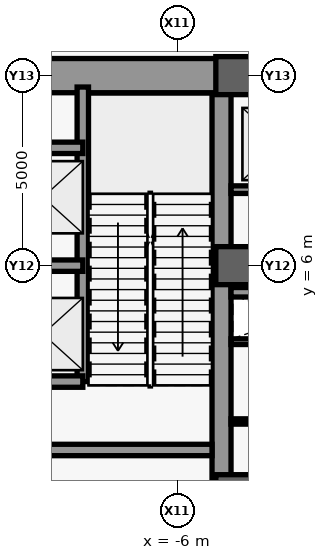
"""IFC4 building model, lengths in metres.
Left out: names, types, materials, properties, quantities, classifications, styles, units other than length and angle.
Written with IfcOpenShell. Run it as: python <this file> out.ifc"""

import sys

from ifc_helpers import new_model, si_unit, direction, frame, frame_2d, origin, origin_2d, place, context, subcontext, project, spatial, rectangle, extrude, source, transform, mapped, element, save


model = new_model("IFC4")
c1 = context("Model", 3, precision=1e-05, world=origin(), true_north=direction((0.0, 1.0)))
c2 = subcontext(c1, "Body", "Model", "MODEL_VIEW")
j1 = project(units=[si_unit("LENGTHUNIT", "METRE"), si_unit("PLANEANGLEUNIT", "RADIAN")], contexts=[c1])
p1 = place(None, origin())
s1 = spatial("IfcSite", under=j1, at=p1, CompositionType="ELEMENT")
p2 = place(p1, origin())
s2 = spatial("IfcBuilding", under=s1, at=p2, CompositionType="ELEMENT")
p3 = place(p2, origin())
s3 = spatial("IfcBuildingStorey", under=s2, at=p3, CompositionType="ELEMENT", Elevation=0.0)
m1 = source(origin(), c2, "Body", "SweptSolid", [
    extrude(rectangle(XDim=21.4, YDim=0.5, at=frame_2d((10.7, 0.0))), origin(), (0.0, 0.0, 1.0), 6.28),
])
p4 = place(p3, frame((-4.85, -10.7, 0.0), z_axis=(0.0, 0.0, 1.0), x_axis=(0.0, 1.0, 0.0)))
e1 = element("IfcWall", 1, at=p4, inside=s3, PredefinedType="SHEAR", context=c2, shape_type="MappedRepresentation", body=[
    mapped(m1, transform((0.0, 0.0, 0.0), scale=1.0)),
])
m2 = source(origin(), c2, "Body", "SweptSolid", [
    extrude(rectangle(XDim=5.85, YDim=0.9, at=frame_2d((2.925, 0.0))), origin(), (0.0, 0.0, 1.0), 6.28),
])
p5 = place(p3, frame((-10.7, 11.0, 0.0), z_axis=(0.0, 0.0, 1.0), x_axis=(1.0, 0.0, 0.0)))
e2 = element("IfcWall", 2, at=p5, inside=s3, PredefinedType="SHEAR", context=c2, shape_type="MappedRepresentation", body=[
    mapped(m2, transform((0.0, 0.0, 0.0), scale=1.0)),
])
m3 = source(origin(), c2, "Body", "SweptSolid", [
    extrude(rectangle(XDim=5.6, YDim=0.3, at=frame_2d((2.8, 0.0))), origin(), (0.0, 0.0, 1.0), 6.28),
])
p6 = place(p3, frame((-10.7, 1.15, 0.0), z_axis=(0.0, 0.0, 1.0), x_axis=(1.0, 0.0, 0.0)))
e3 = element("IfcWall", 3, at=p6, inside=s3, PredefinedType="SHEAR", context=c2, shape_type="MappedRepresentation", body=[
    mapped(m3, transform((0.0, 0.0, 0.0), scale=1.0)),
])
m4 = source(origin(), c2, "Body", "SweptSolid", [
    extrude(rectangle(XDim=9.2, YDim=0.5, at=frame_2d((4.6, 0.0))), origin(), (0.0, 0.0, 1.0), 6.28),
])
p7 = place(p3, frame((-4.6, 11.0, 0.0), z_axis=(0.0, 0.0, 1.0), x_axis=(1.0, 0.0, 0.0)))
e4 = element("IfcWall", 4, at=p7, inside=s3, PredefinedType="SHEAR", context=c2, shape_type="MappedRepresentation", body=[
    mapped(m4, transform((0.0, 0.0, 0.0), scale=1.0)),
])
m5 = source(origin(), c2, "Body", "SweptSolid", [
    extrude(rectangle(XDim=1.8, YDim=2.25, at=frame_2d((0.9, 1.125))), frame((0.0, 0.26, 0.0), z_axis=(0.0, -1.0, 0.0), x_axis=(1.0, 0.0, 0.0)), (0.0, 0.0, 1.0), 0.52),
])
p8 = place(p7, frame((3.7, 0.0, 0.0)))
e5 = element("IfcOpeningElement", 5, at=p8, cuts=e4, PredefinedType="OPENING", context=c2, shape_type="MappedRepresentation", body=[
    mapped(m5, transform((0.0, 0.0, 0.0), scale=1.0)),
])
m6 = source(origin(), c2, "Body", "SweptSolid", [
    extrude(rectangle(XDim=1.0, YDim=1.0, at=origin_2d()), origin(), (0.0, 0.0, 1.0), 6.6),
])
for number, where, z_axis, x_axis in (
    (6, (-4.5, 0.0, 0.0), (0.0, 0.0, 1.0), (1.0, 0.0, 0.0)),
    (7, (-4.5, 6.0, 0.0), (0.0, 0.0, 1.0), (1.0, 0.0, 0.0)),
    (8, (-4.5, 11.0, 0.0), (0.0, 0.0, 1.0), (1.0, 0.0, 0.0)),
):
    element("IfcColumn", number, at=place(p3, frame(where, z_axis=z_axis, x_axis=x_axis)), inside=s3, PredefinedType="COLUMN", context=c2, shape_type="MappedRepresentation", body=[
        mapped(m6, transform((0.0, 0.0, 0.0), scale=1.0)),
    ])
m7 = source(origin(), c2, "Body", "SweptSolid", [
    extrude(rectangle(XDim=7.75, YDim=0.3, at=frame_2d((3.875, 0.0))), origin(), (0.0, 0.0, 1.0), 6.28),
])
p9 = place(p3, frame((-8.5, 2.95, 0.0), z_axis=(0.0, 0.0, 1.0), x_axis=(0.0, 1.0, 0.0)))
e9 = element("IfcWall", 9, at=p9, inside=s3, PredefinedType="SHEAR", context=c2, shape_type="MappedRepresentation", body=[
    mapped(m7, transform((0.0, 0.0, 0.0), scale=1.0)),
])
m8 = source(origin(), c2, "Body", "SweptSolid", [
    extrude(rectangle(XDim=2.2, YDim=0.3, at=frame_2d((1.1, 0.0))), origin(), (0.0, 0.0, 1.0), 6.28),
])
for number, where, z_axis, x_axis in (
    (10, (-10.7, 2.95, 0.0), (0.0, 0.0, 1.0), (1.0, 0.0, 0.0)),
    (11, (-10.7, 6.0, 0.0), (0.0, 0.0, 1.0), (1.0, 0.0, 0.0)),
    (12, (-10.7, 9.1, 0.0), (0.0, 0.0, 1.0), (1.0, 0.0, 0.0)),
):
    element("IfcWall", number, at=place(p3, frame(where, z_axis=z_axis, x_axis=x_axis)), inside=s3, PredefinedType="SHEAR", context=c2, shape_type="MappedRepresentation", body=[
        mapped(m8, transform((0.0, 0.0, 0.0), scale=1.0)),
    ])
m9 = source(origin(), c2, "Body", "SweptSolid", [
    extrude(rectangle(XDim=3.45, YDim=0.15, at=frame_2d((1.725, 0.0))), origin(), (0.0, 0.0, 1.0), 6.28),
])
p10 = place(p3, frame((-4.6, 4.0, 0.0), z_axis=(0.0, 0.0, 1.0), x_axis=(1.0, 0.0, 0.0)))
e13 = element("IfcWall", 13, at=p10, inside=s3, PredefinedType="PARTITIONING", context=c2, shape_type="MappedRepresentation", body=[
    mapped(m9, transform((0.0, 0.0, 0.0), scale=1.0)),
])
m10 = source(origin(), c2, "Body", "SweptSolid", [
    extrude(rectangle(XDim=2.45, YDim=0.2, at=frame_2d((1.225, 0.0))), origin(), (0.0, 0.0, 1.0), 6.28),
])
p11 = place(p3, frame((-4.6, 8.0, 0.0), z_axis=(0.0, 0.0, 1.0), x_axis=(1.0, 0.0, 0.0)))
e14 = element("IfcWall", 14, at=p11, inside=s3, PredefinedType="SHEAR", context=c2, shape_type="MappedRepresentation", body=[
    mapped(m10, transform((0.0, 0.0, 0.0), scale=1.0)),
])
m11 = source(origin(), c2, "Body", "SweptSolid", [
    extrude(rectangle(XDim=9.2, YDim=0.25, at=frame_2d((4.6, 0.0))), origin(), (0.0, 0.0, 1.0), 6.28),
])
p12 = place(p3, frame((-4.6, 5.3, 0.0), z_axis=(0.0, 0.0, 1.0), x_axis=(1.0, 0.0, 0.0)))
e15 = element("IfcWall", 15, at=p12, inside=s3, PredefinedType="SHEAR", context=c2, shape_type="MappedRepresentation", body=[
    mapped(m11, transform((0.0, 0.0, 0.0), scale=1.0)),
])
m12 = source(origin(), c2, "Body", "SweptSolid", [
    extrude(rectangle(XDim=1.05, YDim=2.2, at=frame_2d((0.525, 1.1))), frame((0.0, 0.135, 0.0), z_axis=(0.0, -1.0, 0.0), x_axis=(1.0, 0.0, 0.0)), (0.0, 0.0, 1.0), 0.27),
])
p13 = place(p12, frame((4.075, 0.0, 0.0)))
e16 = element("IfcOpeningElement", 16, at=p13, cuts=e15, PredefinedType="OPENING", context=c2, shape_type="MappedRepresentation", body=[
    mapped(m12, transform((0.0, 0.0, 0.0), scale=1.0)),
])
m13 = source(origin(), c2, "Body", "SweptSolid", [
    extrude(rectangle(XDim=3.45, YDim=0.14, at=frame_2d((1.725, 0.0))), origin(), (0.0, 0.0, 1.0), 6.28),
])
p14 = place(p3, frame((-4.6, 1.9, 0.0), z_axis=(0.0, 0.0, 1.0), x_axis=(1.0, 0.0, 0.0)))
e17 = element("IfcWall", 17, at=p14, inside=s3, PredefinedType="PARTITIONING", context=c2, shape_type="MappedRepresentation", body=[
    mapped(m13, transform((0.0, 0.0, 0.0), scale=1.0)),
])
save(model, sys.argv[1])
